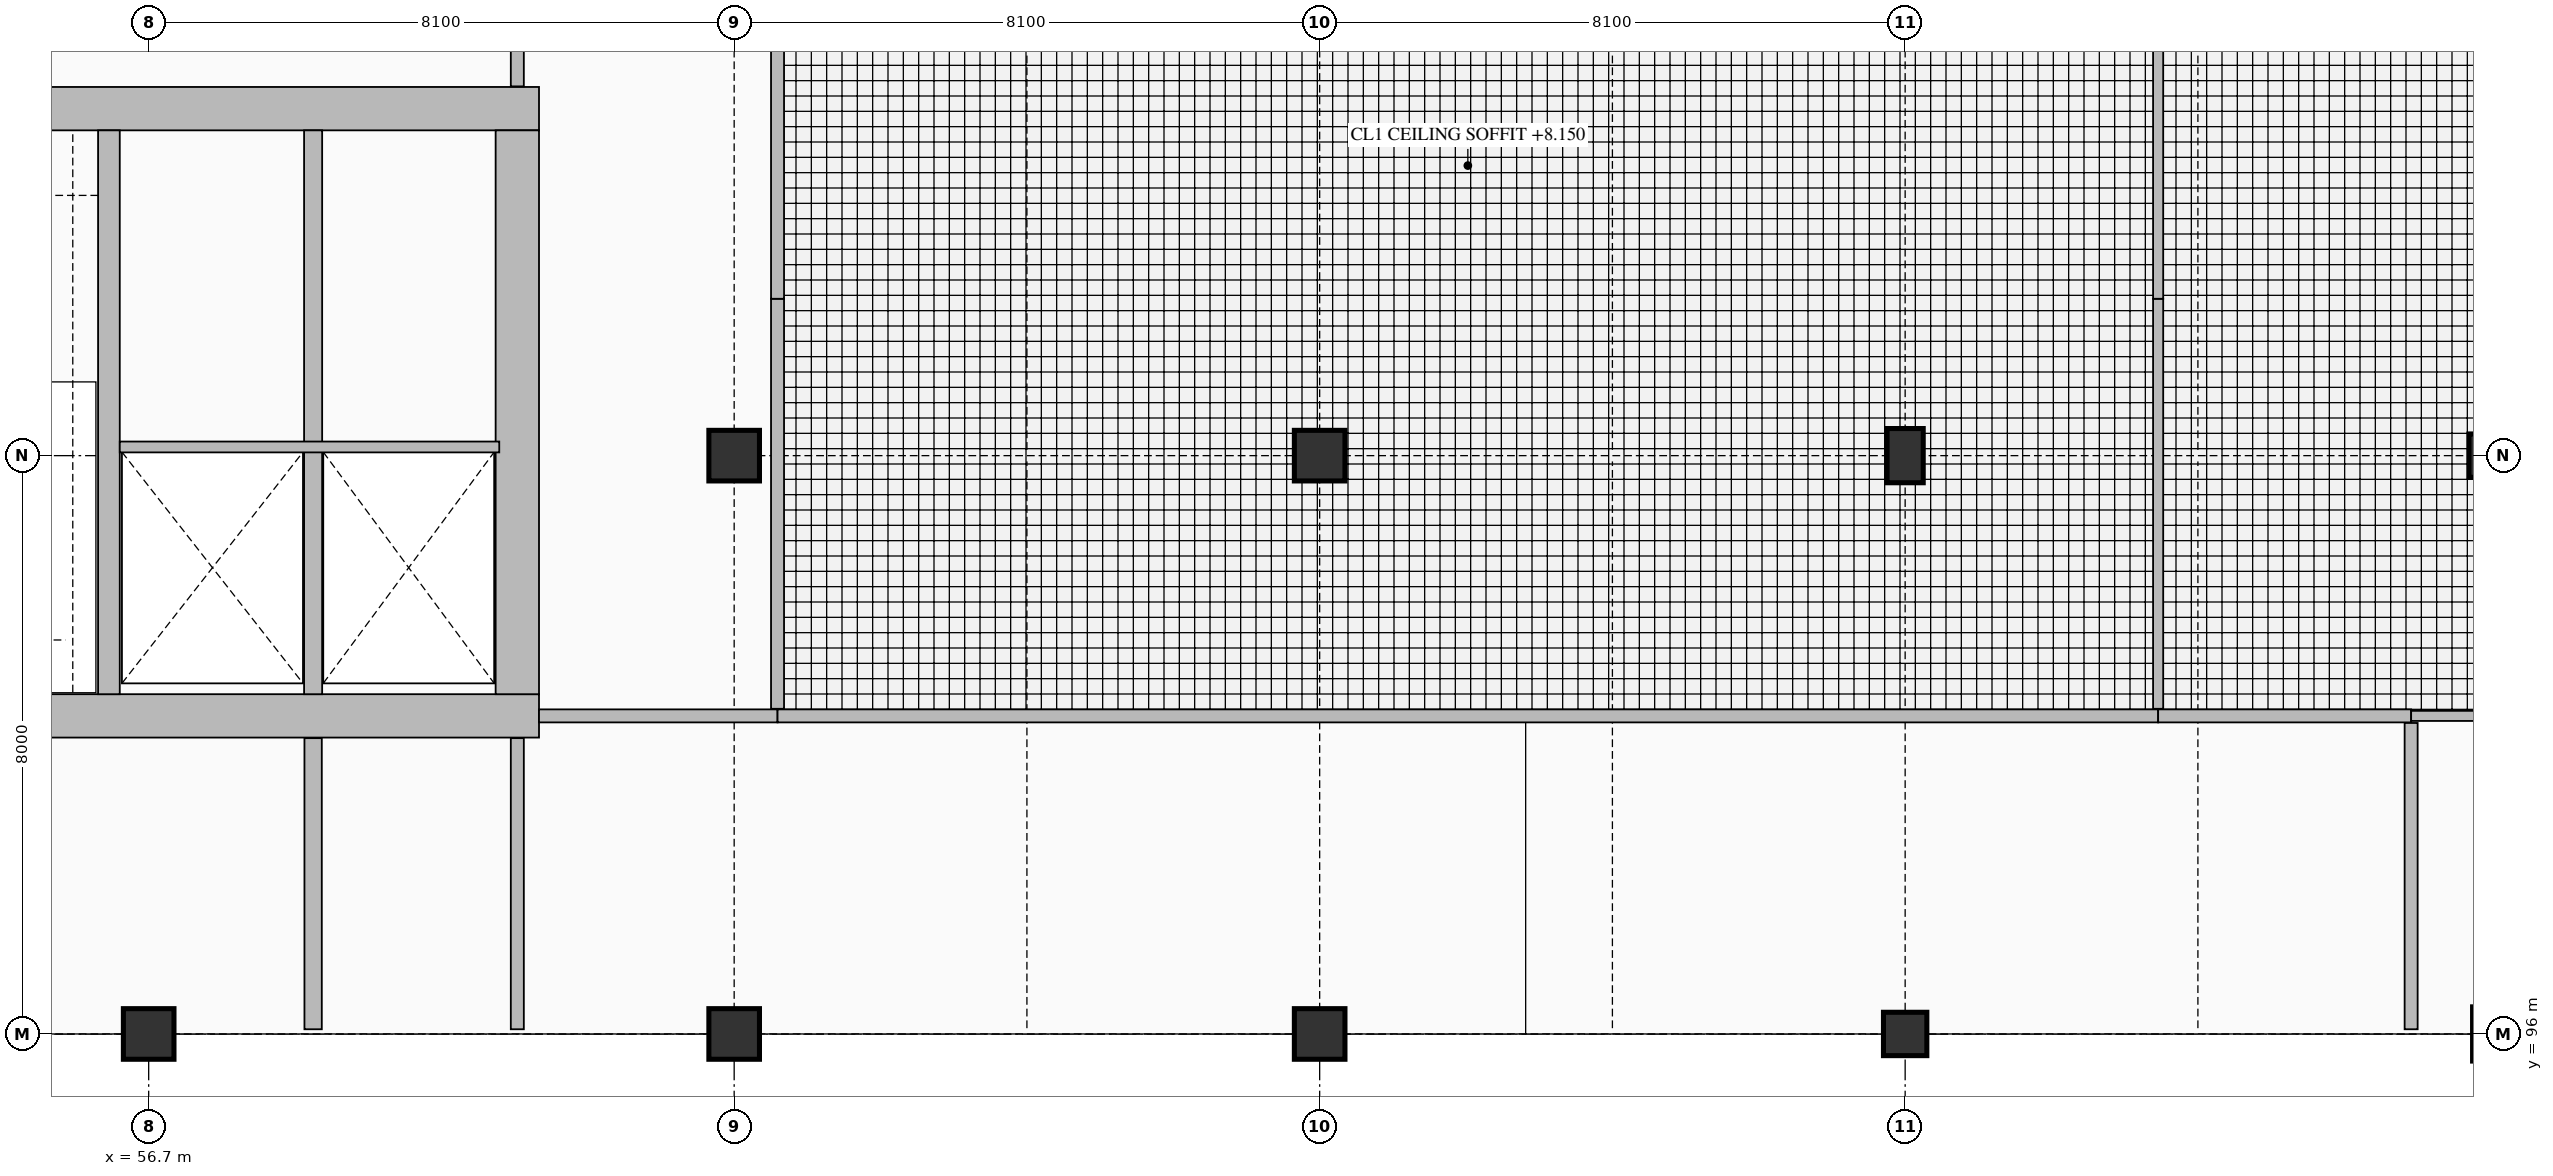
"""IFC4 building model, lengths in metres.
Left out: names, types, materials, properties, quantities, classifications, styles, units other than length and angle.
Written with IfcOpenShell. Run it as: python <this file> out.ifc"""

import sys

from ifc_helpers import new_model, si_unit, direction, frame, frame_2d, origin, origin_2d, place, context, subcontext, project, spatial, rectangle, extrude, element, fill, save


model = new_model("IFC4")
c1 = context("Model", 3, precision=1e-05, world=origin(), true_north=direction((0.0, 1.0)))
c2 = subcontext(c1, "Body", "Model", "MODEL_VIEW")
j1 = project(units=[si_unit("LENGTHUNIT", "METRE"), si_unit("PLANEANGLEUNIT", "RADIAN")], contexts=[c1])
p1 = place(None, origin())
s1 = spatial("IfcSite", under=j1, at=p1, CompositionType="ELEMENT")
p2 = place(p1, origin())
s2 = spatial("IfcBuilding", under=s1, at=p2, CompositionType="ELEMENT")
p3 = place(p2, frame((0.0, 0.0, 5.4)))
s3 = spatial("IfcBuildingStorey", under=s2, at=p3, CompositionType="ELEMENT", Elevation=5.4)
p4 = place(p3, frame((46.7, 100.4, 0.0), z_axis=(0.0, 0.0, 1.0), x_axis=(1.0, 0.0, 0.0)))
e1 = element("IfcWall", 1, at=p4, inside=s3, PredefinedType="SHEAR", context=c2, shape_type="SweptSolid", body=[
    extrude(rectangle(XDim=15.4, YDim=0.6, at=frame_2d((7.7, 0.0))), origin(), (0.0, 0.0, 1.0), 4.8),
])
p5 = place(p4, frame((1.05, 0.0, 0.0)))
e2 = element("IfcOpeningElement", 2, at=p5, cuts=e1, PredefinedType="OPENING", context=c2, shape_type="SweptSolid", body=[
    extrude(rectangle(XDim=1.15, YDim=2.25, at=frame_2d((0.575, 1.125))), frame((0.0, 0.31, 0.0), z_axis=(0.0, -1.0, 0.0), x_axis=(1.0, 0.0, 0.0)), (0.0, 0.0, 1.0), 0.62),
])
p6 = place(p4, frame((10.333, 0.0, 0.0)))
e3 = element("IfcOpeningElement", 3, at=p6, cuts=e1, PredefinedType="OPENING", context=c2, shape_type="SweptSolid", body=[
    extrude(rectangle(XDim=1.1, YDim=2.2, at=frame_2d((0.55, 1.1))), frame((0.0, 0.31, 0.0), z_axis=(0.0, -1.0, 0.0), x_axis=(1.0, 0.0, 0.0)), (0.0, 0.0, 1.0), 0.62),
])
p7 = place(p4, frame((13.048, 0.0, 0.0)))
e4 = element("IfcOpeningElement", 4, at=p7, cuts=e1, PredefinedType="OPENING", context=c2, shape_type="SweptSolid", body=[
    extrude(rectangle(XDim=1.1, YDim=2.2, at=frame_2d((0.55, 1.1))), frame((0.0, 0.31, 0.0), z_axis=(0.0, -1.0, 0.0), x_axis=(1.0, 0.0, 0.0)), (0.0, 0.0, 1.0), 0.62),
])
p8 = place(p3, frame((46.7, 108.8, 0.0), z_axis=(0.0, 0.0, 1.0), x_axis=(1.0, 0.0, 0.0)))
e5 = element("IfcWall", 5, at=p8, inside=s3, PredefinedType="SHEAR", context=c2, shape_type="SweptSolid", body=[
    extrude(rectangle(XDim=15.4, YDim=0.6, at=frame_2d((7.7, 0.0))), origin(), (0.0, 0.0, 1.0), 4.8),
])
p9 = place(p3, frame((61.8, 100.7, 0.0), z_axis=(0.0, 0.0, 1.0), x_axis=(0.0, 1.0, 0.0)))
e6 = element("IfcWall", 6, at=p9, inside=s3, PredefinedType="SHEAR", context=c2, shape_type="SweptSolid", body=[
    extrude(rectangle(XDim=7.8, YDim=0.6, at=frame_2d((3.9, 0.0))), origin(), (0.0, 0.0, 1.0), 4.8),
])
p10 = place(p3, frame((56.15, 100.7, 0.0), z_axis=(0.0, 0.0, 1.0), x_axis=(0.0, 1.0, 0.0)))
e7 = element("IfcWall", 7, at=p10, inside=s3, PredefinedType="SHEAR", context=c2, shape_type="SweptSolid", body=[
    extrude(rectangle(XDim=7.8, YDim=0.3, at=frame_2d((3.9, 0.0))), origin(), (0.0, 0.0, 1.0), 4.8),
])
p11 = place(p3, frame((58.975, 100.7, 0.0), z_axis=(0.0, 0.0, 1.0), x_axis=(0.0, 1.0, 0.0)))
e8 = element("IfcWall", 8, at=p11, inside=s3, PredefinedType="SHEAR", context=c2, shape_type="SweptSolid", body=[
    extrude(rectangle(XDim=7.8, YDim=0.25, at=frame_2d((3.9, 0.0))), origin(), (0.0, 0.0, 1.0), 4.8),
])
for number, where, z_axis, x_axis in (
    (9, (56.7, 96.0, 0.0), (0.0, 0.0, 1.0), (1.0, 0.0, 0.0)),
    (10, (64.8, 96.0, 0.0), (0.0, 0.0, 1.0), (1.0, 0.0, 0.0)),
    (11, (64.8, 104.0, 0.0), (0.0, 0.0, 1.0), (1.0, 0.0, 0.0)),
    (12, (72.9, 96.0, 0.0), (0.0, 0.0, 1.0), (1.0, 0.0, 0.0)),
    (13, (72.9, 104.0, 0.0), (0.0, 0.0, 1.0), (1.0, 0.0, 0.0)),
):
    element("IfcColumn", number, at=place(p3, frame(where, z_axis=z_axis, x_axis=x_axis)), inside=s3, PredefinedType="COLUMN", context=c2, shape_type="SweptSolid", body=[
        extrude(rectangle(XDim=0.7, YDim=0.7, at=origin_2d()), origin(), (0.0, 0.0, 1.0), 4.8),
    ])
p12 = place(p3, frame((81.0, 96.0, 0.0), z_axis=(0.0, 0.0, 1.0), x_axis=(1.0, 0.0, 0.0)))
e14 = element("IfcColumn", 14, at=p12, inside=s3, PredefinedType="COLUMN", context=c2, shape_type="SweptSolid", body=[
    extrude(rectangle(XDim=0.6, YDim=0.6, at=origin_2d()), origin(), (0.0, 0.0, 1.0), 4.8),
])
for number, where, z_axis, x_axis in (
    (15, (81.0, 104.0, 0.0), (0.0, 0.0, 1.0), (1.0, 0.0, 0.0)),
    (16, (89.1, 96.0, 0.0), (0.0, 0.0, 1.0), (1.0, 0.0, 0.0)),
):
    element("IfcColumn", number, at=place(p3, frame(where, z_axis=z_axis, x_axis=x_axis)), inside=s3, PredefinedType="COLUMN", context=c2, shape_type="SweptSolid", body=[
        extrude(rectangle(XDim=0.5, YDim=0.75, at=origin_2d()), origin(), (0.0, 0.0, 1.0), 4.8),
    ])
p13 = place(p3, frame((89.1, 104.0, 0.0), z_axis=(0.0, 0.0, 1.0), x_axis=(1.0, 0.0, 0.0)))
e17 = element("IfcColumn", 17, at=p13, inside=s3, PredefinedType="COLUMN", context=c2, shape_type="SweptSolid", body=[
    extrude(rectangle(XDim=0.6, YDim=0.6, at=origin_2d()), origin(), (0.0, 0.0, 1.0), 4.8),
])
p14 = place(p3, frame((56.3, 104.12, 0.0), z_axis=(0.0, 0.0, 1.0), x_axis=(1.0, 0.0, 0.0)))
e18 = element("IfcWall", 18, at=p14, inside=s3, PredefinedType="PARTITIONING", context=c2, shape_type="SweptSolid", body=[
    extrude(rectangle(XDim=5.25, YDim=0.15, at=frame_2d((2.625, 0.0))), origin(), (0.0, 0.0, 1.0), 4.52),
])
p15 = place(p3, frame((62.1, 100.4, 0.0), z_axis=(0.0, 0.0, 1.0), x_axis=(1.0, 0.0, 0.0)))
e19 = element("IfcWall", 19, at=p15, inside=s3, PredefinedType="PARTITIONING", context=c2, shape_type="SweptSolid", body=[
    extrude(rectangle(XDim=3.3, YDim=0.18, at=frame_2d((1.65, 0.0))), origin(), (0.0, 0.0, 1.0), 4.52),
])
p16 = place(p15, frame((1.05, 0.0, 0.0)))
e20 = element("IfcOpeningElement", 20, at=p16, cuts=e19, PredefinedType="OPENING", context=c2, shape_type="SweptSolid", body=[
    extrude(rectangle(XDim=1.2, YDim=2.2, at=frame_2d((0.6, 1.1))), frame((0.0, 0.1, 0.0), z_axis=(0.0, -1.0, 0.0), x_axis=(1.0, 0.0, 0.0)), (0.0, 0.0, 1.0), 0.2),
])
p17 = place(p3, frame((65.4, 100.4, 0.0), z_axis=(0.0, 0.0, 1.0), x_axis=(1.0, 0.0, 0.0)))
e21 = element("IfcWall", 21, at=p17, inside=s3, PredefinedType="PARTITIONING", context=c2, shape_type="SweptSolid", body=[
    extrude(rectangle(XDim=19.1, YDim=0.18, at=frame_2d((9.55, 0.0))), origin(), (0.0, 0.0, 1.0), 4.52),
])
p18 = place(p17, frame((9.0, 0.0, 0.0)))
e22 = element("IfcOpeningElement", 22, at=p18, cuts=e21, PredefinedType="OPENING", context=c2, shape_type="SweptSolid", body=[
    extrude(rectangle(XDim=1.1, YDim=2.3, at=frame_2d((0.55, 1.15))), frame((0.0, 0.1, 0.0), z_axis=(0.0, -1.0, 0.0), x_axis=(1.0, 0.0, 0.0)), (0.0, 0.0, 1.0), 0.2),
])
p19 = place(p3, frame((84.5, 100.4, 0.0), z_axis=(0.0, 0.0, 1.0), x_axis=(1.0, 0.0, 0.0)))
e23 = element("IfcWall", 23, at=p19, inside=s3, PredefinedType="PARTITIONING", context=c2, shape_type="SweptSolid", body=[
    extrude(rectangle(XDim=3.5, YDim=0.18, at=frame_2d((1.75, 0.0))), origin(), (0.0, 0.0, 1.0), 4.52),
])
p20 = place(p19, frame((1.2, 0.0, 0.0)))
e24 = element("IfcOpeningElement", 24, at=p20, cuts=e23, PredefinedType="OPENING", context=c2, shape_type="SweptSolid", body=[
    extrude(rectangle(XDim=1.1, YDim=2.3, at=frame_2d((0.55, 1.15))), frame((0.0, 0.1, 0.0), z_axis=(0.0, -1.0, 0.0), x_axis=(1.0, 0.0, 0.0)), (0.0, 0.0, 1.0), 0.2),
])
p21 = place(p3, frame((88.0, 100.4, 0.0), z_axis=(0.0, 0.0, 1.0), x_axis=(1.0, 0.0, 0.0)))
e25 = element("IfcWall", 25, at=p21, inside=s3, PredefinedType="PARTITIONING", context=c2, shape_type="SweptSolid", body=[
    extrude(rectangle(XDim=5.706, YDim=0.14, at=frame_2d((2.853, 0.0))), origin(), (0.0, 0.0, 1.0), 4.52),
])
p22 = place(p3, frame((58.975, 96.065, 0.0), z_axis=(0.0, 0.0, 1.0), x_axis=(0.0, 1.0, 0.0)))
e26 = element("IfcWall", 26, at=p22, inside=s3, PredefinedType="PARTITIONING", context=c2, shape_type="SweptSolid", body=[
    extrude(rectangle(XDim=4.027, YDim=0.24, at=frame_2d((2.014, 0.0))), origin(), (0.0, 0.0, 1.0), 4.52),
])
p23 = place(p3, frame((61.8, 96.065, 0.0), z_axis=(0.0, 0.0, 1.0), x_axis=(0.0, 1.0, 0.0)))
e27 = element("IfcWall", 27, at=p23, inside=s3, PredefinedType="PARTITIONING", context=c2, shape_type="SweptSolid", body=[
    extrude(rectangle(XDim=4.027, YDim=0.18, at=frame_2d((2.014, 0.0))), origin(), (0.0, 0.0, 1.0), 4.52),
])
p24 = place(p23, frame((1.463, 0.0, 0.0)))
e28 = element("IfcOpeningElement", 28, at=p24, cuts=e27, PredefinedType="OPENING", context=c2, shape_type="SweptSolid", body=[
    extrude(rectangle(XDim=1.1, YDim=2.2, at=frame_2d((0.55, 1.1))), frame((0.0, 0.1, 0.0), z_axis=(0.0, -1.0, 0.0), x_axis=(1.0, 0.0, 0.0)), (0.0, 0.0, 1.0), 0.2),
])
p25 = place(p3, frame((61.8, 109.108, 0.0), z_axis=(0.0, 0.0, 1.0), x_axis=(0.0, 1.0, 0.0)))
e29 = element("IfcWall", 29, at=p25, inside=s3, PredefinedType="PARTITIONING", context=c2, shape_type="SweptSolid", body=[
    extrude(rectangle(XDim=2.734, YDim=0.18, at=frame_2d((1.367, 0.0))), origin(), (0.0, 0.0, 1.0), 4.52),
])
p26 = place(p25, frame((0.817, 0.0, 0.0)))
e30 = element("IfcOpeningElement", 30, at=p26, cuts=e29, PredefinedType="OPENING", context=c2, shape_type="SweptSolid", body=[
    extrude(rectangle(XDim=1.1, YDim=2.2, at=frame_2d((0.55, 1.1))), frame((0.0, 0.1, 0.0), z_axis=(0.0, -1.0, 0.0), x_axis=(1.0, 0.0, 0.0)), (0.0, 0.0, 1.0), 0.2),
])
p27 = place(p3, frame((65.4, 100.498, 0.0), z_axis=(0.0, 0.0, 1.0), x_axis=(0.0, 1.0, 0.0)))
e31 = element("IfcWall", 31, at=p27, inside=s3, PredefinedType="PARTITIONING", context=c2, shape_type="SweptSolid", body=[
    extrude(rectangle(XDim=5.672, YDim=0.18, at=frame_2d((2.836, 0.0))), origin(), (0.0, 0.0, 1.0), 4.52),
])
p28 = place(p3, frame((65.4, 106.17, 0.0), z_axis=(0.0, 0.0, 1.0), x_axis=(0.0, 1.0, 0.0)))
e32 = element("IfcWall", 32, at=p28, inside=s3, PredefinedType="PARTITIONING", context=c2, shape_type="SweptSolid", body=[
    extrude(rectangle(XDim=5.672, YDim=0.18, at=frame_2d((2.836, 0.0))), origin(), (0.0, 0.0, 1.0), 4.52),
])
p29 = place(p3, frame((84.5, 100.498, 0.0), z_axis=(0.0, 0.0, 1.0), x_axis=(0.0, 1.0, 0.0)))
e33 = element("IfcWall", 33, at=p29, inside=s3, PredefinedType="PARTITIONING", context=c2, shape_type="SweptSolid", body=[
    extrude(rectangle(XDim=5.672, YDim=0.14, at=frame_2d((2.836, 0.0))), origin(), (0.0, 0.0, 1.0), 4.52),
])
p30 = place(p3, frame((84.5, 106.17, 0.0), z_axis=(0.0, 0.0, 1.0), x_axis=(0.0, 1.0, 0.0)))
e34 = element("IfcWall", 34, at=p30, inside=s3, PredefinedType="PARTITIONING", context=c2, shape_type="SweptSolid", body=[
    extrude(rectangle(XDim=5.672, YDim=0.14, at=frame_2d((2.836, 0.0))), origin(), (0.0, 0.0, 1.0), 4.52),
])
p31 = place(p3, frame((88.0, 96.065, 0.0), z_axis=(0.0, 0.0, 1.0), x_axis=(0.0, 1.0, 0.0)))
e35 = element("IfcWall", 35, at=p31, inside=s3, PredefinedType="PARTITIONING", context=c2, shape_type="SweptSolid", body=[
    extrude(rectangle(XDim=4.237, YDim=0.18, at=frame_2d((2.119, 0.0))), origin(), (0.0, 0.0, 1.0), 4.52),
])
p32 = place(p31, frame((1.569, 0.0, 0.0)))
e36 = element("IfcOpeningElement", 36, at=p32, cuts=e35, PredefinedType="OPENING", context=c2, shape_type="SweptSolid", body=[
    extrude(rectangle(XDim=1.1, YDim=2.3, at=frame_2d((0.55, 1.15))), frame((0.0, 0.1, 0.0), z_axis=(0.0, -1.0, 0.0), x_axis=(1.0, 0.0, 0.0)), (0.0, 0.0, 1.0), 0.2),
])
p33 = place(p6, frame((1.1, 0.0, 0.0), z_axis=(0.0, 0.0, 1.0), x_axis=(-1.0, 0.0, 0.0)))
e37 = element("IfcDoor", 37, at=p33, inside=s3, OperationType="DOUBLE_DOOR_SLIDING", PredefinedType="DOOR", context=c2, shape_type="SweptSolid", body=[
    extrude(rectangle(XDim=1.1, YDim=2.2, at=frame_2d((0.55, 1.1))), frame((0.0, 0.025, 0.0), z_axis=(0.0, -1.0, 0.0), x_axis=(1.0, 0.0, 0.0)), (0.0, 0.0, 1.0), 0.05),
])
fill(e3, e37)
p34 = place(p7, frame((1.1, 0.0, 0.0), z_axis=(0.0, 0.0, 1.0), x_axis=(-1.0, 0.0, 0.0)))
e38 = element("IfcDoor", 38, at=p34, inside=s3, OperationType="DOUBLE_DOOR_SLIDING", PredefinedType="DOOR", context=c2, shape_type="SweptSolid", body=[
    extrude(rectangle(XDim=1.1, YDim=2.2, at=frame_2d((0.55, 1.1))), frame((0.0, 0.025, 0.0), z_axis=(0.0, -1.0, 0.0), x_axis=(1.0, 0.0, 0.0)), (0.0, 0.0, 1.0), 0.05),
])
fill(e4, e38)
p35 = place(p16, frame((1.2, 0.0, 0.0), z_axis=(0.0, 0.0, 1.0), x_axis=(-1.0, 0.0, 0.0)))
e39 = element("IfcDoor", 39, at=p35, inside=s3, OperationType="SINGLE_SWING_RIGHT", PredefinedType="DOOR", context=c2, shape_type="SweptSolid", body=[
    extrude(rectangle(XDim=1.2, YDim=2.2, at=frame_2d((0.6, 1.1))), frame((0.0, 0.025, 0.0), z_axis=(0.0, -1.0, 0.0), x_axis=(1.0, 0.0, 0.0)), (0.0, 0.0, 1.0), 0.05),
])
fill(e20, e39)
p36 = place(p18, origin())
e40 = element("IfcDoor", 40, at=p36, inside=s3, OperationType="SINGLE_SWING_LEFT", PredefinedType="DOOR", context=c2, shape_type="SweptSolid", body=[
    extrude(rectangle(XDim=1.1, YDim=2.3, at=frame_2d((0.55, 1.15))), frame((0.0, 0.025, 0.0), z_axis=(0.0, -1.0, 0.0), x_axis=(1.0, 0.0, 0.0)), (0.0, 0.0, 1.0), 0.05),
])
fill(e22, e40)
p37 = place(p20, origin())
e41 = element("IfcDoor", 41, at=p37, inside=s3, OperationType="SINGLE_SWING_RIGHT", PredefinedType="DOOR", context=c2, shape_type="SweptSolid", body=[
    extrude(rectangle(XDim=1.1, YDim=2.3, at=frame_2d((0.55, 1.15))), frame((0.0, 0.025, 0.0), z_axis=(0.0, -1.0, 0.0), x_axis=(1.0, 0.0, 0.0)), (0.0, 0.0, 1.0), 0.05),
])
fill(e24, e41)
p38 = place(p24, frame((1.1, 0.0, 0.0), z_axis=(0.0, 0.0, 1.0), x_axis=(-1.0, 0.0, 0.0)))
e42 = element("IfcDoor", 42, at=p38, inside=s3, OperationType="SINGLE_SWING_RIGHT", PredefinedType="DOOR", context=c2, shape_type="SweptSolid", body=[
    extrude(rectangle(XDim=1.1, YDim=2.2, at=frame_2d((0.55, 1.1))), frame((0.0, 0.025, 0.0), z_axis=(0.0, -1.0, 0.0), x_axis=(1.0, 0.0, 0.0)), (0.0, 0.0, 1.0), 0.05),
])
fill(e28, e42)
p39 = place(p32, frame((1.1, 0.0, 0.0), z_axis=(0.0, 0.0, 1.0), x_axis=(-1.0, 0.0, 0.0)))
e43 = element("IfcDoor", 43, at=p39, inside=s3, OperationType="SINGLE_SWING_LEFT", PredefinedType="DOOR", context=c2, shape_type="SweptSolid", body=[
    extrude(rectangle(XDim=1.1, YDim=2.3, at=frame_2d((0.55, 1.15))), frame((0.0, 0.025, 0.0), z_axis=(0.0, -1.0, 0.0), x_axis=(1.0, 0.0, 0.0)), (0.0, 0.0, 1.0), 0.05),
])
fill(e36, e43)
save(model, sys.argv[1])
